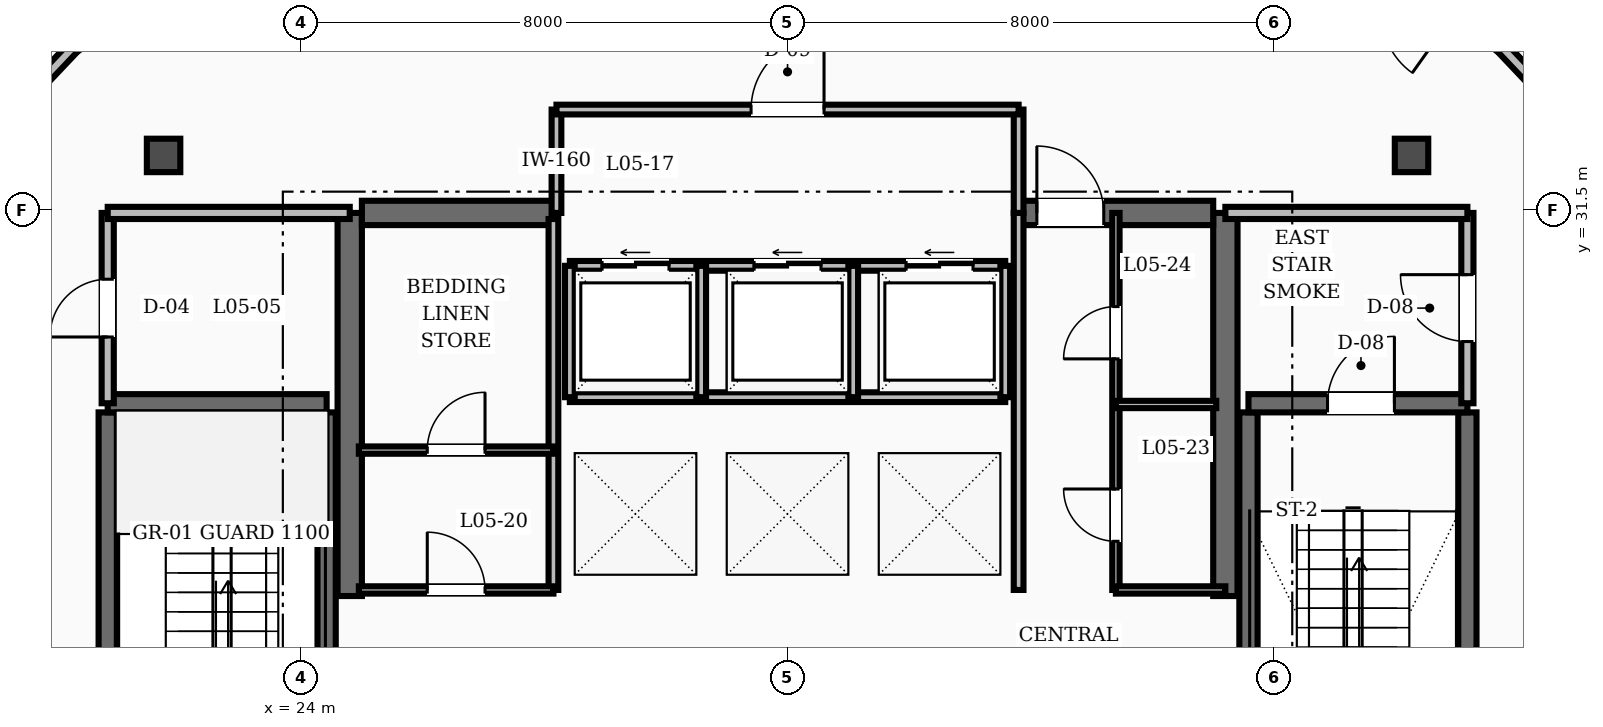
"""IFC4 building model, lengths in metres.
Left out: names, types, materials, properties, quantities, classifications, styles, units other than length and angle.
Written with IfcOpenShell. Run it as: python <this file> out.ifc"""

import sys

from ifc_helpers import new_model, si_unit, direction, frame, frame_2d, origin, place, context, subcontext, project, spatial, rectangle, extrude, element, fill, save


model = new_model("IFC4")
c1 = context("Model", 3, precision=1e-05, world=origin(), true_north=direction((0.0, 1.0)))
c2 = subcontext(c1, "Body", "Model", "MODEL_VIEW")
j1 = project(units=[si_unit("LENGTHUNIT", "METRE"), si_unit("PLANEANGLEUNIT", "RADIAN")], contexts=[c1])
p1 = place(None, origin())
s1 = spatial("IfcSite", under=j1, at=p1, CompositionType="ELEMENT")
p2 = place(p1, origin())
s2 = spatial("IfcBuilding", under=s1, at=p2, CompositionType="ELEMENT")
p3 = place(p2, frame((0.0, 0.0, 24.4)))
s3 = spatial("IfcBuildingStorey", under=s2, at=p3, CompositionType="ELEMENT", Elevation=24.4)
for number, where, z_axis, x_axis in (
    (1, (24.8, 25.15, 0.0), (0.0, 0.0, 1.0), (0.0, 1.0, 0.0)),
    (2, (39.2, 25.15, 0.0), (0.0, 0.0, 1.0), (0.0, 1.0, 0.0)),
):
    element("IfcWall", number, at=place(p3, frame(where, z_axis=z_axis, x_axis=x_axis)), inside=s3, PredefinedType="SHEAR", context=c2, shape_type="SweptSolid", body=[
        extrude(rectangle(XDim=6.3, YDim=0.4, at=frame_2d((3.15, 0.0))), origin(), (0.0, 0.0, 1.0), 6.0),
    ])
p4 = place(p3, frame((25.0, 31.45, 0.0), z_axis=(0.0, 0.0, 1.0), x_axis=(1.0, 0.0, 0.0)))
e3 = element("IfcWall", 3, at=p4, inside=s3, PredefinedType="SHEAR", context=c2, shape_type="SweptSolid", body=[
    extrude(rectangle(XDim=3.2, YDim=0.4, at=frame_2d((1.6, 0.0))), origin(), (0.0, 0.0, 1.0), 6.0),
])
p5 = place(p3, frame((35.8, 31.45, 0.0), z_axis=(0.0, 0.0, 1.0), x_axis=(1.0, 0.0, 0.0)))
e4 = element("IfcWall", 4, at=p5, inside=s3, PredefinedType="SHEAR", context=c2, shape_type="SweptSolid", body=[
    extrude(rectangle(XDim=3.2, YDim=0.4, at=frame_2d((1.6, 0.0))), origin(), (0.0, 0.0, 1.0), 6.0),
])
p6 = place(p5, frame((0.3, 0.0, 0.0)))
e5 = element("IfcOpeningElement", 5, at=p6, cuts=e4, PredefinedType="OPENING", context=c2, shape_type="SweptSolid", body=[
    extrude(rectangle(XDim=1.1, YDim=2.1, at=frame_2d((0.55, 1.05))), frame((0.0, 0.21, 0.0), z_axis=(0.0, -1.0, 0.0), x_axis=(1.0, 0.0, 0.0)), (0.0, 0.0, 1.0), 0.42),
])
for number, where, z_axis, x_axis in (
    (6, (20.82, 19.43, 0.0), (0.0, 0.0, 1.0), (0.0, 1.0, 0.0)),
    (7, (24.42, 19.43, 0.0), (0.0, 0.0, 1.0), (0.0, 1.0, 0.0)),
):
    element("IfcWall", number, at=place(p3, frame(where, z_axis=z_axis, x_axis=x_axis)), inside=s3, PredefinedType="SHEAR", context=c2, shape_type="SweptSolid", body=[
        extrude(rectangle(XDim=8.74, YDim=0.3, at=frame_2d((4.37, 0.0))), origin(), (0.0, 0.0, 1.0), 6.0),
    ])
p7 = place(p3, frame((20.82, 28.32, 0.0), z_axis=(0.0, 0.0, 1.0), x_axis=(1.0, 0.0, 0.0)))
e8 = element("IfcWall", 8, at=p7, inside=s3, PredefinedType="SHEAR", context=c2, shape_type="SweptSolid", body=[
    extrude(rectangle(XDim=3.6, YDim=0.3, at=frame_2d((1.8, 0.0))), origin(), (0.0, 0.0, 1.0), 6.0),
])
for number, where, z_axis, x_axis in (
    (9, (43.18, 19.43, 0.0), (0.0, 0.0, 1.0), (0.0, 1.0, 0.0)),
    (10, (39.58, 19.43, 0.0), (0.0, 0.0, 1.0), (0.0, 1.0, 0.0)),
):
    element("IfcWall", number, at=place(p3, frame(where, z_axis=z_axis, x_axis=x_axis)), inside=s3, PredefinedType="SHEAR", context=c2, shape_type="SweptSolid", body=[
        extrude(rectangle(XDim=8.74, YDim=0.3, at=frame_2d((4.37, 0.0))), origin(), (0.0, 0.0, 1.0), 6.0),
    ])
p8 = place(p3, frame((39.58, 28.32, 0.0), z_axis=(0.0, 0.0, 1.0), x_axis=(1.0, 0.0, 0.0)))
e11 = element("IfcWall", 11, at=p8, inside=s3, PredefinedType="SHEAR", context=c2, shape_type="SweptSolid", body=[
    extrude(rectangle(XDim=3.6, YDim=0.3, at=frame_2d((1.8, 0.0))), origin(), (0.0, 0.0, 1.0), 6.0),
])
p9 = place(p8, frame((1.3, 0.0, 0.0)))
e12 = element("IfcOpeningElement", 12, at=p9, cuts=e11, PredefinedType="OPENING", context=c2, shape_type="SweptSolid", body=[
    extrude(rectangle(XDim=1.1, YDim=2.1, at=frame_2d((0.55, 1.05))), frame((0.0, 0.16, 0.0), z_axis=(0.0, -1.0, 0.0), x_axis=(1.0, 0.0, 0.0)), (0.0, 0.0, 1.0), 0.32),
])
p10 = place(p3, frame((43.18, 28.32, 0.0), z_axis=(0.0, 0.0, 1.0), x_axis=(0.0, 1.0, 0.0)))
e13 = element("IfcWall", 13, at=p10, inside=s3, PredefinedType="SOLIDWALL", context=c2, shape_type="SweptSolid", body=[
    extrude(rectangle(XDim=3.13, YDim=0.2, at=frame_2d((1.565, 0.0))), origin(), (0.0, 0.0, 1.0), 4.71),
])
p11 = place(p10, frame((1.015, 0.0, 0.0)))
e14 = element("IfcOpeningElement", 14, at=p11, cuts=e13, PredefinedType="OPENING", context=c2, shape_type="SweptSolid", body=[
    extrude(rectangle(XDim=1.1, YDim=2.1, at=frame_2d((0.55, 1.05))), frame((0.0, 0.11, 0.0), z_axis=(0.0, -1.0, 0.0), x_axis=(1.0, 0.0, 0.0)), (0.0, 0.0, 1.0), 0.22),
])
p12 = place(p3, frame((39.2, 31.45, 0.0), z_axis=(0.0, 0.0, 1.0), x_axis=(1.0, 0.0, 0.0)))
e15 = element("IfcWall", 15, at=p12, inside=s3, PredefinedType="SOLIDWALL", context=c2, shape_type="SweptSolid", body=[
    extrude(rectangle(XDim=3.98, YDim=0.2, at=frame_2d((1.99, 0.0))), origin(), (0.0, 0.0, 1.0), 4.71),
])
p13 = place(p3, frame((20.82, 28.32, 0.0), z_axis=(0.0, 0.0, 1.0), x_axis=(0.0, 1.0, 0.0)))
e16 = element("IfcWall", 16, at=p13, inside=s3, PredefinedType="SOLIDWALL", context=c2, shape_type="SweptSolid", body=[
    extrude(rectangle(XDim=3.13, YDim=0.2, at=frame_2d((1.565, 0.0))), origin(), (0.0, 0.0, 1.0), 4.71),
])
p14 = place(p13, frame((1.09, 0.0, 0.0)))
e17 = element("IfcOpeningElement", 17, at=p14, cuts=e16, PredefinedType="OPENING", context=c2, shape_type="SweptSolid", body=[
    extrude(rectangle(XDim=0.95, YDim=2.1, at=frame_2d((0.475, 1.05))), frame((0.0, 0.11, 0.0), z_axis=(0.0, -1.0, 0.0), x_axis=(1.0, 0.0, 0.0)), (0.0, 0.0, 1.0), 0.22),
])
p15 = place(p3, frame((20.82, 31.45, 0.0), z_axis=(0.0, 0.0, 1.0), x_axis=(1.0, 0.0, 0.0)))
e18 = element("IfcWall", 18, at=p15, inside=s3, PredefinedType="SOLIDWALL", context=c2, shape_type="SweptSolid", body=[
    extrude(rectangle(XDim=3.98, YDim=0.2, at=frame_2d((1.99, 0.0))), origin(), (0.0, 0.0, 1.0), 4.71),
])
p16 = place(p3, frame((35.8, 25.25, 0.0), z_axis=(0.0, 0.0, 1.0), x_axis=(0.0, 1.0, 0.0)))
e19 = element("IfcWall", 19, at=p16, inside=s3, PredefinedType="SOLIDWALL", context=c2, shape_type="SweptSolid", body=[
    extrude(rectangle(XDim=6.2, YDim=0.16, at=frame_2d((3.1, 0.0))), origin(), (0.0, 0.0, 1.0), 4.71),
])
p17 = place(p3, frame((28.42, 30.58, 0.0), z_axis=(0.0, 0.0, 1.0), x_axis=(1.0, 0.0, 0.0)))
e20 = element("IfcWall", 20, at=p17, inside=s3, PredefinedType="SOLIDWALL", context=c2, shape_type="SweptSolid", body=[
    extrude(rectangle(XDim=7.16, YDim=0.16, at=frame_2d((3.58, 0.0))), origin(), (0.0, 0.0, 1.0), 4.71),
])
p18 = place(p17, frame((0.53, 0.0, 0.0)))
e21 = element("IfcOpeningElement", 21, at=p18, cuts=e20, PredefinedType="OPENING", context=c2, shape_type="SweptSolid", body=[
    extrude(rectangle(XDim=1.1, YDim=2.15, at=frame_2d((0.55, 1.075))), frame((0.0, 0.09, 0.0), z_axis=(0.0, -1.0, 0.0), x_axis=(1.0, 0.0, 0.0)), (0.0, 0.0, 1.0), 0.18),
])
p19 = place(p17, frame((3.03, 0.0, 0.0)))
e22 = element("IfcOpeningElement", 22, at=p19, cuts=e20, PredefinedType="OPENING", context=c2, shape_type="SweptSolid", body=[
    extrude(rectangle(XDim=1.1, YDim=2.15, at=frame_2d((0.55, 1.075))), frame((0.0, 0.09, 0.0), z_axis=(0.0, -1.0, 0.0), x_axis=(1.0, 0.0, 0.0)), (0.0, 0.0, 1.0), 0.18),
])
p20 = place(p17, frame((5.53, 0.0, 0.0)))
e23 = element("IfcOpeningElement", 23, at=p20, cuts=e20, PredefinedType="OPENING", context=c2, shape_type="SweptSolid", body=[
    extrude(rectangle(XDim=1.1, YDim=2.15, at=frame_2d((0.55, 1.075))), frame((0.0, 0.09, 0.0), z_axis=(0.0, -1.0, 0.0), x_axis=(1.0, 0.0, 0.0)), (0.0, 0.0, 1.0), 0.18),
])
p21 = place(p3, frame((28.42, 28.42, 0.0), z_axis=(0.0, 0.0, 1.0), x_axis=(1.0, 0.0, 0.0)))
e24 = element("IfcWall", 24, at=p21, inside=s3, PredefinedType="SOLIDWALL", context=c2, shape_type="SweptSolid", body=[
    extrude(rectangle(XDim=7.16, YDim=0.16, at=frame_2d((3.58, 0.0))), origin(), (0.0, 0.0, 1.0), 4.71),
])
for number, where, z_axis, x_axis in (
    (25, (28.42, 28.42, 0.0), (0.0, 0.0, 1.0), (0.0, 1.0, 0.0)),
    (26, (30.58, 28.42, 0.0), (0.0, 0.0, 1.0), (0.0, 1.0, 0.0)),
    (27, (33.08, 28.42, 0.0), (0.0, 0.0, 1.0), (0.0, 1.0, 0.0)),
    (28, (35.58, 28.42, 0.0), (0.0, 0.0, 1.0), (0.0, 1.0, 0.0)),
):
    element("IfcWall", number, at=place(p3, frame(where, z_axis=z_axis, x_axis=x_axis)), inside=s3, PredefinedType="SOLIDWALL", context=c2, shape_type="SweptSolid", body=[
        extrude(rectangle(XDim=2.16, YDim=0.16, at=frame_2d((1.08, 0.0))), origin(), (0.0, 0.0, 1.0), 4.71),
    ])
for number, where, z_axis, x_axis in (
    (29, (28.2, 31.45, 0.0), (0.0, 0.0, 1.0), (0.0, 1.0, 0.0)),
    (30, (35.8, 31.45, 0.0), (0.0, 0.0, 1.0), (0.0, 1.0, 0.0)),
):
    element("IfcWall", number, at=place(p3, frame(where, z_axis=z_axis, x_axis=x_axis)), inside=s3, PredefinedType="SOLIDWALL", context=c2, shape_type="SweptSolid", body=[
        extrude(rectangle(XDim=1.7, YDim=0.16, at=frame_2d((0.85, 0.0))), origin(), (0.0, 0.0, 1.0), 4.71),
    ])
p22 = place(p3, frame((28.2, 33.15, 0.0), z_axis=(0.0, 0.0, 1.0), x_axis=(1.0, 0.0, 0.0)))
e31 = element("IfcWall", 31, at=p22, inside=s3, PredefinedType="SOLIDWALL", context=c2, shape_type="SweptSolid", body=[
    extrude(rectangle(XDim=7.6, YDim=0.16, at=frame_2d((3.8, 0.0))), origin(), (0.0, 0.0, 1.0), 4.71),
])
p23 = place(p22, frame((3.2, 0.0, 0.0)))
e32 = element("IfcOpeningElement", 32, at=p23, cuts=e31, PredefinedType="OPENING", context=c2, shape_type="SweptSolid", body=[
    extrude(rectangle(XDim=1.2, YDim=2.1, at=frame_2d((0.6, 1.05))), frame((0.0, 0.09, 0.0), z_axis=(0.0, -1.0, 0.0), x_axis=(1.0, 0.0, 0.0)), (0.0, 0.0, 1.0), 0.18),
])
p24 = place(p3, frame((28.15, 25.25, 0.0), z_axis=(0.0, 0.0, 1.0), x_axis=(0.0, 1.0, 0.0)))
e33 = element("IfcWall", 33, at=p24, inside=s3, PredefinedType="SOLIDWALL", context=c2, shape_type="SweptSolid", body=[
    extrude(rectangle(XDim=6.1, YDim=0.16, at=frame_2d((3.05, 0.0))), origin(), (0.0, 0.0, 1.0), 4.71),
])
p25 = place(p3, frame((24.95, 25.25, 0.0), z_axis=(0.0, 0.0, 1.0), x_axis=(1.0, 0.0, 0.0)))
e34 = element("IfcWall", 34, at=p25, inside=s3, PredefinedType="PARTITIONING", context=c2, shape_type="SweptSolid", body=[
    extrude(rectangle(XDim=3.2, YDim=0.12, at=frame_2d((1.6, 0.0))), origin(), (0.0, 0.0, 1.0), 4.71),
])
p26 = place(p25, frame((1.125, 0.0, 0.0)))
e35 = element("IfcOpeningElement", 35, at=p26, cuts=e34, PredefinedType="OPENING", context=c2, shape_type="SweptSolid", body=[
    extrude(rectangle(XDim=0.95, YDim=2.1, at=frame_2d((0.475, 1.05))), frame((0.0, 0.07, 0.0), z_axis=(0.0, -1.0, 0.0), x_axis=(1.0, 0.0, 0.0)), (0.0, 0.0, 1.0), 0.14),
])
p27 = place(p3, frame((37.4, 25.25, 0.0), z_axis=(0.0, 0.0, 1.0), x_axis=(0.0, 1.0, 0.0)))
e36 = element("IfcWall", 36, at=p27, inside=s3, PredefinedType="PARTITIONING", context=c2, shape_type="SweptSolid", body=[
    extrude(rectangle(XDim=6.2, YDim=0.12, at=frame_2d((3.1, 0.0))), origin(), (0.0, 0.0, 1.0), 4.71),
])
p28 = place(p27, frame((0.8, 0.0, 0.0)))
e37 = element("IfcOpeningElement", 37, at=p28, cuts=e36, PredefinedType="OPENING", context=c2, shape_type="SweptSolid", body=[
    extrude(rectangle(XDim=0.86, YDim=2.1, at=frame_2d((0.43, 1.05))), frame((0.0, 0.07, 0.0), z_axis=(0.0, -1.0, 0.0), x_axis=(1.0, 0.0, 0.0)), (0.0, 0.0, 1.0), 0.14),
])
p29 = place(p27, frame((3.8, 0.0, 0.0)))
e38 = element("IfcOpeningElement", 38, at=p29, cuts=e36, PredefinedType="OPENING", context=c2, shape_type="SweptSolid", body=[
    extrude(rectangle(XDim=0.86, YDim=2.1, at=frame_2d((0.43, 1.05))), frame((0.0, 0.07, 0.0), z_axis=(0.0, -1.0, 0.0), x_axis=(1.0, 0.0, 0.0)), (0.0, 0.0, 1.0), 0.14),
])
p30 = place(p3, frame((37.4, 25.25, 0.0), z_axis=(0.0, 0.0, 1.0), x_axis=(1.0, 0.0, 0.0)))
e39 = element("IfcWall", 39, at=p30, inside=s3, PredefinedType="PARTITIONING", context=c2, shape_type="SweptSolid", body=[
    extrude(rectangle(XDim=1.8, YDim=0.12, at=frame_2d((0.9, 0.0))), origin(), (0.0, 0.0, 1.0), 4.71),
])
p31 = place(p3, frame((24.95, 27.55, 0.0), z_axis=(0.0, 0.0, 1.0), x_axis=(1.0, 0.0, 0.0)))
e40 = element("IfcWall", 40, at=p31, inside=s3, PredefinedType="PARTITIONING", context=c2, shape_type="SweptSolid", body=[
    extrude(rectangle(XDim=3.2, YDim=0.12, at=frame_2d((1.6, 0.0))), origin(), (0.0, 0.0, 1.0), 4.71),
])
p32 = place(p31, frame((1.125, 0.0, 0.0)))
e41 = element("IfcOpeningElement", 41, at=p32, cuts=e40, PredefinedType="OPENING", context=c2, shape_type="SweptSolid", body=[
    extrude(rectangle(XDim=0.95, YDim=2.1, at=frame_2d((0.475, 1.05))), frame((0.0, 0.07, 0.0), z_axis=(0.0, -1.0, 0.0), x_axis=(1.0, 0.0, 0.0)), (0.0, 0.0, 1.0), 0.14),
])
p33 = place(p3, frame((37.4, 28.3, 0.0), z_axis=(0.0, 0.0, 1.0), x_axis=(1.0, 0.0, 0.0)))
e42 = element("IfcWall", 42, at=p33, inside=s3, PredefinedType="PARTITIONING", context=c2, shape_type="SweptSolid", body=[
    extrude(rectangle(XDim=1.65, YDim=0.12, at=frame_2d((0.825, 0.0))), origin(), (0.0, 0.0, 1.0), 4.71),
])
for number, where, z_axis, x_axis in (
    (43, (45.802, 32.0, 0.0), (0.0, 0.0, 1.0), (-0.687, 0.726, 0.0)),
    (44, (20.262, 34.182, 0.0), (0.0, 0.0, 1.0), (-0.687, -0.726, 0.0)),
):
    element("IfcWall", number, at=place(p3, frame(where, z_axis=z_axis, x_axis=x_axis)), inside=s3, PredefinedType="SOLIDWALL", context=c2, shape_type="SweptSolid", body=[
        extrude(rectangle(XDim=3.004, YDim=0.2, at=frame_2d((1.502, 0.0))), origin(), (0.0, 0.0, 1.0), 4.71),
    ])
p34 = place(p9, origin())
e45 = element("IfcDoor", 45, at=p34, inside=s3, OperationType="SINGLE_SWING_RIGHT", PredefinedType="DOOR", context=c2, shape_type="SweptSolid", body=[
    extrude(rectangle(XDim=1.1, YDim=2.1, at=frame_2d((0.55, 1.05))), frame((0.0, 0.025, 0.0), z_axis=(0.0, -1.0, 0.0), x_axis=(1.0, 0.0, 0.0)), (0.0, 0.0, 1.0), 0.05),
])
fill(e12, e45)
p35 = place(p11, origin())
e46 = element("IfcDoor", 46, at=p35, inside=s3, OperationType="SINGLE_SWING_RIGHT", PredefinedType="DOOR", context=c2, shape_type="SweptSolid", body=[
    extrude(rectangle(XDim=1.1, YDim=2.1, at=frame_2d((0.55, 1.05))), frame((0.0, 0.025, 0.0), z_axis=(0.0, -1.0, 0.0), x_axis=(1.0, 0.0, 0.0)), (0.0, 0.0, 1.0), 0.05),
])
fill(e14, e46)
p36 = place(p14, origin())
e47 = element("IfcDoor", 47, at=p36, inside=s3, OperationType="SINGLE_SWING_LEFT", PredefinedType="DOOR", context=c2, shape_type="SweptSolid", body=[
    extrude(rectangle(XDim=0.95, YDim=2.1, at=frame_2d((0.475, 1.05))), frame((0.0, 0.025, 0.0), z_axis=(0.0, -1.0, 0.0), x_axis=(1.0, 0.0, 0.0)), (0.0, 0.0, 1.0), 0.05),
])
fill(e17, e47)
p37 = place(p6, origin())
e48 = element("IfcDoor", 48, at=p37, inside=s3, OperationType="SINGLE_SWING_LEFT", PredefinedType="DOOR", context=c2, shape_type="SweptSolid", body=[
    extrude(rectangle(XDim=1.1, YDim=2.1, at=frame_2d((0.55, 1.05))), frame((0.0, 0.025, 0.0), z_axis=(0.0, -1.0, 0.0), x_axis=(1.0, 0.0, 0.0)), (0.0, 0.0, 1.0), 0.05),
])
fill(e5, e48)
p38 = place(p18, origin())
e49 = element("IfcDoor", 49, at=p38, inside=s3, OperationType="SLIDING_TO_LEFT", PredefinedType="DOOR", context=c2, shape_type="SweptSolid", body=[
    extrude(rectangle(XDim=1.1, YDim=2.15, at=frame_2d((0.55, 1.075))), frame((0.0, 0.025, 0.0), z_axis=(0.0, -1.0, 0.0), x_axis=(1.0, 0.0, 0.0)), (0.0, 0.0, 1.0), 0.05),
])
fill(e21, e49)
p39 = place(p19, origin())
e50 = element("IfcDoor", 50, at=p39, inside=s3, OperationType="SLIDING_TO_LEFT", PredefinedType="DOOR", context=c2, shape_type="SweptSolid", body=[
    extrude(rectangle(XDim=1.1, YDim=2.15, at=frame_2d((0.55, 1.075))), frame((0.0, 0.025, 0.0), z_axis=(0.0, -1.0, 0.0), x_axis=(1.0, 0.0, 0.0)), (0.0, 0.0, 1.0), 0.05),
])
fill(e22, e50)
p40 = place(p20, origin())
e51 = element("IfcDoor", 51, at=p40, inside=s3, OperationType="SLIDING_TO_LEFT", PredefinedType="DOOR", context=c2, shape_type="SweptSolid", body=[
    extrude(rectangle(XDim=1.1, YDim=2.15, at=frame_2d((0.55, 1.075))), frame((0.0, 0.025, 0.0), z_axis=(0.0, -1.0, 0.0), x_axis=(1.0, 0.0, 0.0)), (0.0, 0.0, 1.0), 0.05),
])
fill(e23, e51)
p41 = place(p23, origin())
e52 = element("IfcDoor", 52, at=p41, inside=s3, OperationType="SINGLE_SWING_RIGHT", PredefinedType="DOOR", context=c2, shape_type="SweptSolid", body=[
    extrude(rectangle(XDim=1.2, YDim=2.1, at=frame_2d((0.6, 1.05))), frame((0.0, 0.025, 0.0), z_axis=(0.0, -1.0, 0.0), x_axis=(1.0, 0.0, 0.0)), (0.0, 0.0, 1.0), 0.05),
])
fill(e32, e52)
p42 = place(p26, origin())
e53 = element("IfcDoor", 53, at=p42, inside=s3, OperationType="SINGLE_SWING_LEFT", PredefinedType="DOOR", context=c2, shape_type="SweptSolid", body=[
    extrude(rectangle(XDim=0.95, YDim=2.1, at=frame_2d((0.475, 1.05))), frame((0.0, 0.025, 0.0), z_axis=(0.0, -1.0, 0.0), x_axis=(1.0, 0.0, 0.0)), (0.0, 0.0, 1.0), 0.05),
])
fill(e35, e53)
p43 = place(p32, origin())
e54 = element("IfcDoor", 54, at=p43, inside=s3, OperationType="SINGLE_SWING_RIGHT", PredefinedType="DOOR", context=c2, shape_type="SweptSolid", body=[
    extrude(rectangle(XDim=0.95, YDim=2.1, at=frame_2d((0.475, 1.05))), frame((0.0, 0.025, 0.0), z_axis=(0.0, -1.0, 0.0), x_axis=(1.0, 0.0, 0.0)), (0.0, 0.0, 1.0), 0.05),
])
fill(e41, e54)
p44 = place(p28, origin())
e55 = element("IfcDoor", 55, at=p44, inside=s3, OperationType="SINGLE_SWING_RIGHT", PredefinedType="DOOR", context=c2, shape_type="SweptSolid", body=[
    extrude(rectangle(XDim=0.86, YDim=2.1, at=frame_2d((0.43, 1.05))), frame((0.0, 0.025, 0.0), z_axis=(0.0, -1.0, 0.0), x_axis=(1.0, 0.0, 0.0)), (0.0, 0.0, 1.0), 0.05),
])
fill(e37, e55)
p45 = place(p29, origin())
e56 = element("IfcDoor", 56, at=p45, inside=s3, OperationType="SINGLE_SWING_LEFT", PredefinedType="DOOR", context=c2, shape_type="SweptSolid", body=[
    extrude(rectangle(XDim=0.86, YDim=2.1, at=frame_2d((0.43, 1.05))), frame((0.0, 0.025, 0.0), z_axis=(0.0, -1.0, 0.0), x_axis=(1.0, 0.0, 0.0)), (0.0, 0.0, 1.0), 0.05),
])
fill(e38, e56)
save(model, sys.argv[1])
